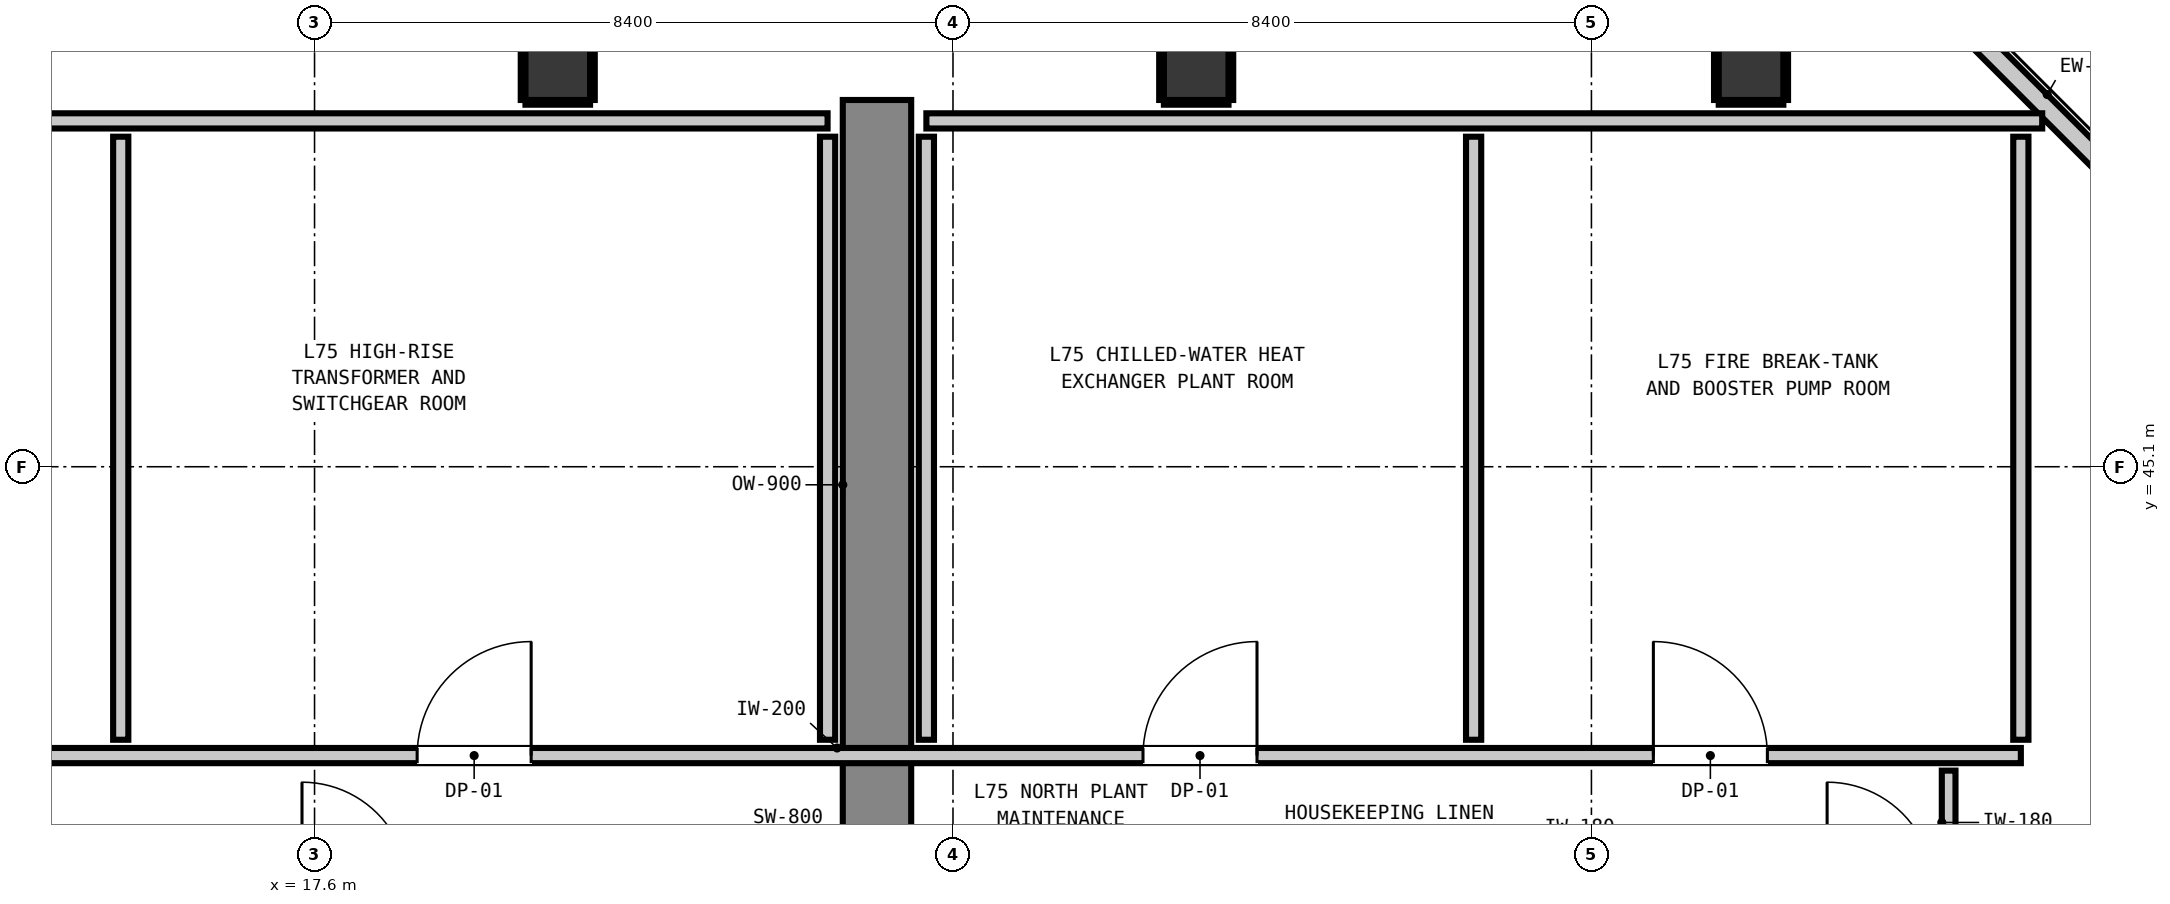
"""IFC4 building model, lengths in metres.
Left out: names, types, materials, properties, quantities, classifications, styles, units other than length and angle.
Written with IfcOpenShell. Run it as: python <this file> out.ifc"""

import sys

from ifc_helpers import new_model, si_unit, direction, frame, frame_2d, origin, origin_2d, place, context, subcontext, project, spatial, rectangle, extrude, element, fill, save


model = new_model("IFC4")
c1 = context("Model", 3, precision=1e-05, world=origin(), true_north=direction((0.0, 1.0)))
c2 = subcontext(c1, "Body", "Model", "MODEL_VIEW")
j1 = project(units=[si_unit("LENGTHUNIT", "METRE"), si_unit("PLANEANGLEUNIT", "RADIAN")], contexts=[c1])
p1 = place(None, origin())
s1 = spatial("IfcSite", under=j1, at=p1, CompositionType="ELEMENT")
p2 = place(p1, origin())
s2 = spatial("IfcBuilding", under=s1, at=p2, CompositionType="ELEMENT")
p3 = place(p2, frame((0.0, 0.0, 257.84)))
s3 = spatial("IfcBuildingStorey", under=s2, at=p3, CompositionType="ELEMENT", Elevation=257.84)
for number, where, z_axis, x_axis in (
    (1, (20.8, 50.35, 0.0), (0.0, 0.0, 1.0), (1.0, 0.0, 0.0)),
    (2, (29.2, 50.35, 0.0), (0.0, 0.0, 1.0), (1.0, 0.0, 0.0)),
    (3, (36.5, 50.35, 0.0), (0.0, 0.0, 1.0), (1.0, 0.0, 0.0)),
):
    element("IfcColumn", number, at=place(p3, frame(where, z_axis=z_axis, x_axis=x_axis)), inside=s3, PredefinedType="COLUMN", context=c2, shape_type="SweptSolid", body=[
        extrude(rectangle(XDim=0.85, YDim=0.85, at=origin_2d()), origin(), (0.0, 0.0, 1.0), 4.4),
    ])
p4 = place(p3, frame((25.0, 39.8, 0.0), z_axis=(0.0, 0.0, 1.0), x_axis=(0.0, 1.0, 0.0)))
e4 = element("IfcWall", 4, at=p4, inside=s3, PredefinedType="SHEAR", context=c2, shape_type="SweptSolid", body=[
    extrude(rectangle(XDim=10.125, YDim=0.9, at=frame_2d((5.062, 0.0))), origin(), (0.0, 0.0, 1.0), 4.18),
])
p5 = place(p3, frame((39.255, 50.955, 0.0), z_axis=(0.0, 0.0, 1.0), x_axis=(0.707106781187, -0.707106781187, 0.0)))
e5 = element("IfcWall", 5, at=p5, inside=s3, PredefinedType="STANDARD", context=c2, shape_type="SweptSolid", body=[
    extrude(rectangle(XDim=2.97, YDim=0.26, at=frame_2d((1.485, 0.0))), origin(), (0.0, 0.0, 1.0), 4.18),
])
p6 = place(p3, frame((5.75, 41.3, 0.0), z_axis=(0.0, 0.0, 1.0), x_axis=(1.0, 0.0, 0.0)))
e6 = element("IfcWall", 6, at=p6, inside=s3, PredefinedType="PARTITIONING", context=c2, shape_type="SweptSolid", body=[
    extrude(rectangle(XDim=34.3, YDim=0.2, at=frame_2d((17.15, 0.0))), origin(), (0.0, 0.0, 1.0), 4.18),
])
p7 = place(p6, frame((22.75, 0.0, 0.0)))
e7 = element("IfcOpeningElement", 7, at=p7, cuts=e6, PredefinedType="OPENING", context=c2, shape_type="SweptSolid", body=[
    extrude(rectangle(XDim=1.5, YDim=2.15, at=frame_2d((0.75, 1.075))), frame((0.0, 0.11, 0.0), z_axis=(0.0, -1.0, 0.0), x_axis=(1.0, 0.0, 0.0)), (0.0, 0.0, 1.0), 0.22),
])
p8 = place(p6, frame((29.465, 0.0, 0.0)))
e8 = element("IfcOpeningElement", 8, at=p8, cuts=e6, PredefinedType="OPENING", context=c2, shape_type="SweptSolid", body=[
    extrude(rectangle(XDim=1.5, YDim=2.15, at=frame_2d((0.75, 1.075))), frame((0.0, 0.11, 0.0), z_axis=(0.0, -1.0, 0.0), x_axis=(1.0, 0.0, 0.0)), (0.0, 0.0, 1.0), 0.22),
])
p9 = place(p6, frame((6.435, 0.0, 0.0)))
e9 = element("IfcOpeningElement", 9, at=p9, cuts=e6, PredefinedType="OPENING", context=c2, shape_type="SweptSolid", body=[
    extrude(rectangle(XDim=1.5, YDim=2.15, at=frame_2d((0.75, 1.075))), frame((0.0, 0.11, 0.0), z_axis=(0.0, -1.0, 0.0), x_axis=(1.0, 0.0, 0.0)), (0.0, 0.0, 1.0), 0.22),
])
p10 = place(p6, frame((13.2, 0.0, 0.0)))
e10 = element("IfcOpeningElement", 10, at=p10, cuts=e6, PredefinedType="OPENING", context=c2, shape_type="SweptSolid", body=[
    extrude(rectangle(XDim=1.5, YDim=2.15, at=frame_2d((0.75, 1.075))), frame((0.0, 0.11, 0.0), z_axis=(0.0, -1.0, 0.0), x_axis=(1.0, 0.0, 0.0)), (0.0, 0.0, 1.0), 0.22),
])
p11 = place(p3, frame((5.469, 49.65, 0.0), z_axis=(0.0, 0.0, 1.0), x_axis=(1.0, 0.0, 0.0)))
e11 = element("IfcWall", 11, at=p11, inside=s3, PredefinedType="PARTITIONING", context=c2, shape_type="SweptSolid", body=[
    extrude(rectangle(XDim=18.881, YDim=0.2, at=frame_2d((9.44, 0.0))), origin(), (0.0, 0.0, 1.0), 4.18),
])
p12 = place(p3, frame((25.65, 49.65, 0.0), z_axis=(0.0, 0.0, 1.0), x_axis=(1.0, 0.0, 0.0)))
e12 = element("IfcWall", 12, at=p12, inside=s3, PredefinedType="PARTITIONING", context=c2, shape_type="SweptSolid", body=[
    extrude(rectangle(XDim=14.681, YDim=0.2, at=frame_2d((7.341, 0.0))), origin(), (0.0, 0.0, 1.0), 4.18),
])
for number, where, z_axis, x_axis in (
    (13, (15.05, 41.508, 0.0), (0.0, 0.0, 1.0), (0.0, 1.0, 0.0)),
    (14, (24.35, 41.508, 0.0), (0.0, 0.0, 1.0), (0.0, 1.0, 0.0)),
    (15, (25.65, 41.508, 0.0), (0.0, 0.0, 1.0), (0.0, 1.0, 0.0)),
    (16, (32.85, 41.508, 0.0), (0.0, 0.0, 1.0), (0.0, 1.0, 0.0)),
):
    element("IfcWall", number, at=place(p3, frame(where, z_axis=z_axis, x_axis=x_axis)), inside=s3, PredefinedType="PARTITIONING", context=c2, shape_type="SweptSolid", body=[
        extrude(rectangle(XDim=7.934, YDim=0.2, at=frame_2d((3.967, 0.0))), origin(), (0.0, 0.0, 1.0), 4.18),
    ])
p13 = place(p3, frame((40.05, 41.508, 0.0), z_axis=(0.0, 0.0, 1.0), x_axis=(0.0, 1.0, 0.0)))
e17 = element("IfcWall", 17, at=p13, inside=s3, PredefinedType="PARTITIONING", context=c2, shape_type="SweptSolid", body=[
    extrude(rectangle(XDim=7.934, YDim=0.2, at=frame_2d((3.967, 0.0))), origin(), (0.0, 0.0, 1.0), 3.557),
])
p14 = place(p3, frame((39.1, 39.738, 0.0), z_axis=(0.0, 0.0, 1.0), x_axis=(0.0, 1.0, 0.0)))
e18 = element("IfcWall", 18, at=p14, inside=s3, PredefinedType="PARTITIONING", context=c2, shape_type="SweptSolid", body=[
    extrude(rectangle(XDim=1.364, YDim=0.18, at=frame_2d((0.682, 0.0))), origin(), (0.0, 0.0, 1.0), 4.18),
])
p15 = place(p3, frame((20.375, 49.893, 0.0), z_axis=(0.0, 0.0, 1.0), x_axis=(1.0, 0.0, 0.0)))
e19 = element("IfcWall", 19, at=p15, inside=s3, PredefinedType="PARTITIONING", context=c2, shape_type="SweptSolid", body=[
    extrude(rectangle(XDim=0.85, YDim=0.06, at=frame_2d((0.425, 0.0))), origin(), (0.0, 0.0, 1.0), 1.45),
])
for number, where, z_axis, x_axis in (
    (20, (20.343, 49.925, 0.0), (0.0, 0.0, 1.0), (0.0, 1.0, 0.0)),
    (21, (21.257, 49.925, 0.0), (0.0, 0.0, 1.0), (0.0, 1.0, 0.0)),
):
    element("IfcWall", number, at=place(p3, frame(where, z_axis=z_axis, x_axis=x_axis)), inside=s3, PredefinedType="PARTITIONING", context=c2, shape_type="SweptSolid", body=[
        extrude(rectangle(XDim=0.85, YDim=0.06, at=frame_2d((0.425, 0.0))), origin(), (0.0, 0.0, 1.0), 1.45),
    ])
p16 = place(p3, frame((28.775, 49.893, 0.0), z_axis=(0.0, 0.0, 1.0), x_axis=(1.0, 0.0, 0.0)))
e22 = element("IfcWall", 22, at=p16, inside=s3, PredefinedType="PARTITIONING", context=c2, shape_type="SweptSolid", body=[
    extrude(rectangle(XDim=0.85, YDim=0.06, at=frame_2d((0.425, 0.0))), origin(), (0.0, 0.0, 1.0), 1.45),
])
for number, where, z_axis, x_axis in (
    (23, (28.743, 49.925, 0.0), (0.0, 0.0, 1.0), (0.0, 1.0, 0.0)),
    (24, (29.657, 49.925, 0.0), (0.0, 0.0, 1.0), (0.0, 1.0, 0.0)),
):
    element("IfcWall", number, at=place(p3, frame(where, z_axis=z_axis, x_axis=x_axis)), inside=s3, PredefinedType="PARTITIONING", context=c2, shape_type="SweptSolid", body=[
        extrude(rectangle(XDim=0.85, YDim=0.06, at=frame_2d((0.425, 0.0))), origin(), (0.0, 0.0, 1.0), 1.45),
    ])
p17 = place(p3, frame((36.075, 49.893, 0.0), z_axis=(0.0, 0.0, 1.0), x_axis=(1.0, 0.0, 0.0)))
e25 = element("IfcWall", 25, at=p17, inside=s3, PredefinedType="PARTITIONING", context=c2, shape_type="SweptSolid", body=[
    extrude(rectangle(XDim=0.85, YDim=0.06, at=frame_2d((0.425, 0.0))), origin(), (0.0, 0.0, 1.0), 1.45),
])
for number, where, z_axis, x_axis in (
    (26, (36.043, 49.925, 0.0), (0.0, 0.0, 1.0), (0.0, 1.0, 0.0)),
    (27, (36.957, 49.925, 0.0), (0.0, 0.0, 1.0), (0.0, 1.0, 0.0)),
):
    element("IfcWall", number, at=place(p3, frame(where, z_axis=z_axis, x_axis=x_axis)), inside=s3, PredefinedType="PARTITIONING", context=c2, shape_type="SweptSolid", body=[
        extrude(rectangle(XDim=0.85, YDim=0.06, at=frame_2d((0.425, 0.0))), origin(), (0.0, 0.0, 1.0), 1.45),
    ])
p18 = place(p7, origin())
e28 = element("IfcDoor", 28, at=p18, inside=s3, OperationType="SINGLE_SWING_RIGHT", PredefinedType="DOOR", context=c2, shape_type="SweptSolid", body=[
    extrude(rectangle(XDim=1.5, YDim=2.15, at=frame_2d((0.75, 1.075))), frame((0.0, 0.025, 0.0), z_axis=(0.0, -1.0, 0.0), x_axis=(1.0, 0.0, 0.0)), (0.0, 0.0, 1.0), 0.05),
])
fill(e7, e28)
p19 = place(p8, origin())
e29 = element("IfcDoor", 29, at=p19, inside=s3, OperationType="SINGLE_SWING_LEFT", PredefinedType="DOOR", context=c2, shape_type="SweptSolid", body=[
    extrude(rectangle(XDim=1.5, YDim=2.15, at=frame_2d((0.75, 1.075))), frame((0.0, 0.025, 0.0), z_axis=(0.0, -1.0, 0.0), x_axis=(1.0, 0.0, 0.0)), (0.0, 0.0, 1.0), 0.05),
])
fill(e8, e29)
p20 = place(p10, origin())
e30 = element("IfcDoor", 30, at=p20, inside=s3, OperationType="SINGLE_SWING_RIGHT", PredefinedType="DOOR", context=c2, shape_type="SweptSolid", body=[
    extrude(rectangle(XDim=1.5, YDim=2.15, at=frame_2d((0.75, 1.075))), frame((0.0, 0.025, 0.0), z_axis=(0.0, -1.0, 0.0), x_axis=(1.0, 0.0, 0.0)), (0.0, 0.0, 1.0), 0.05),
])
fill(e10, e30)
save(model, sys.argv[1])
